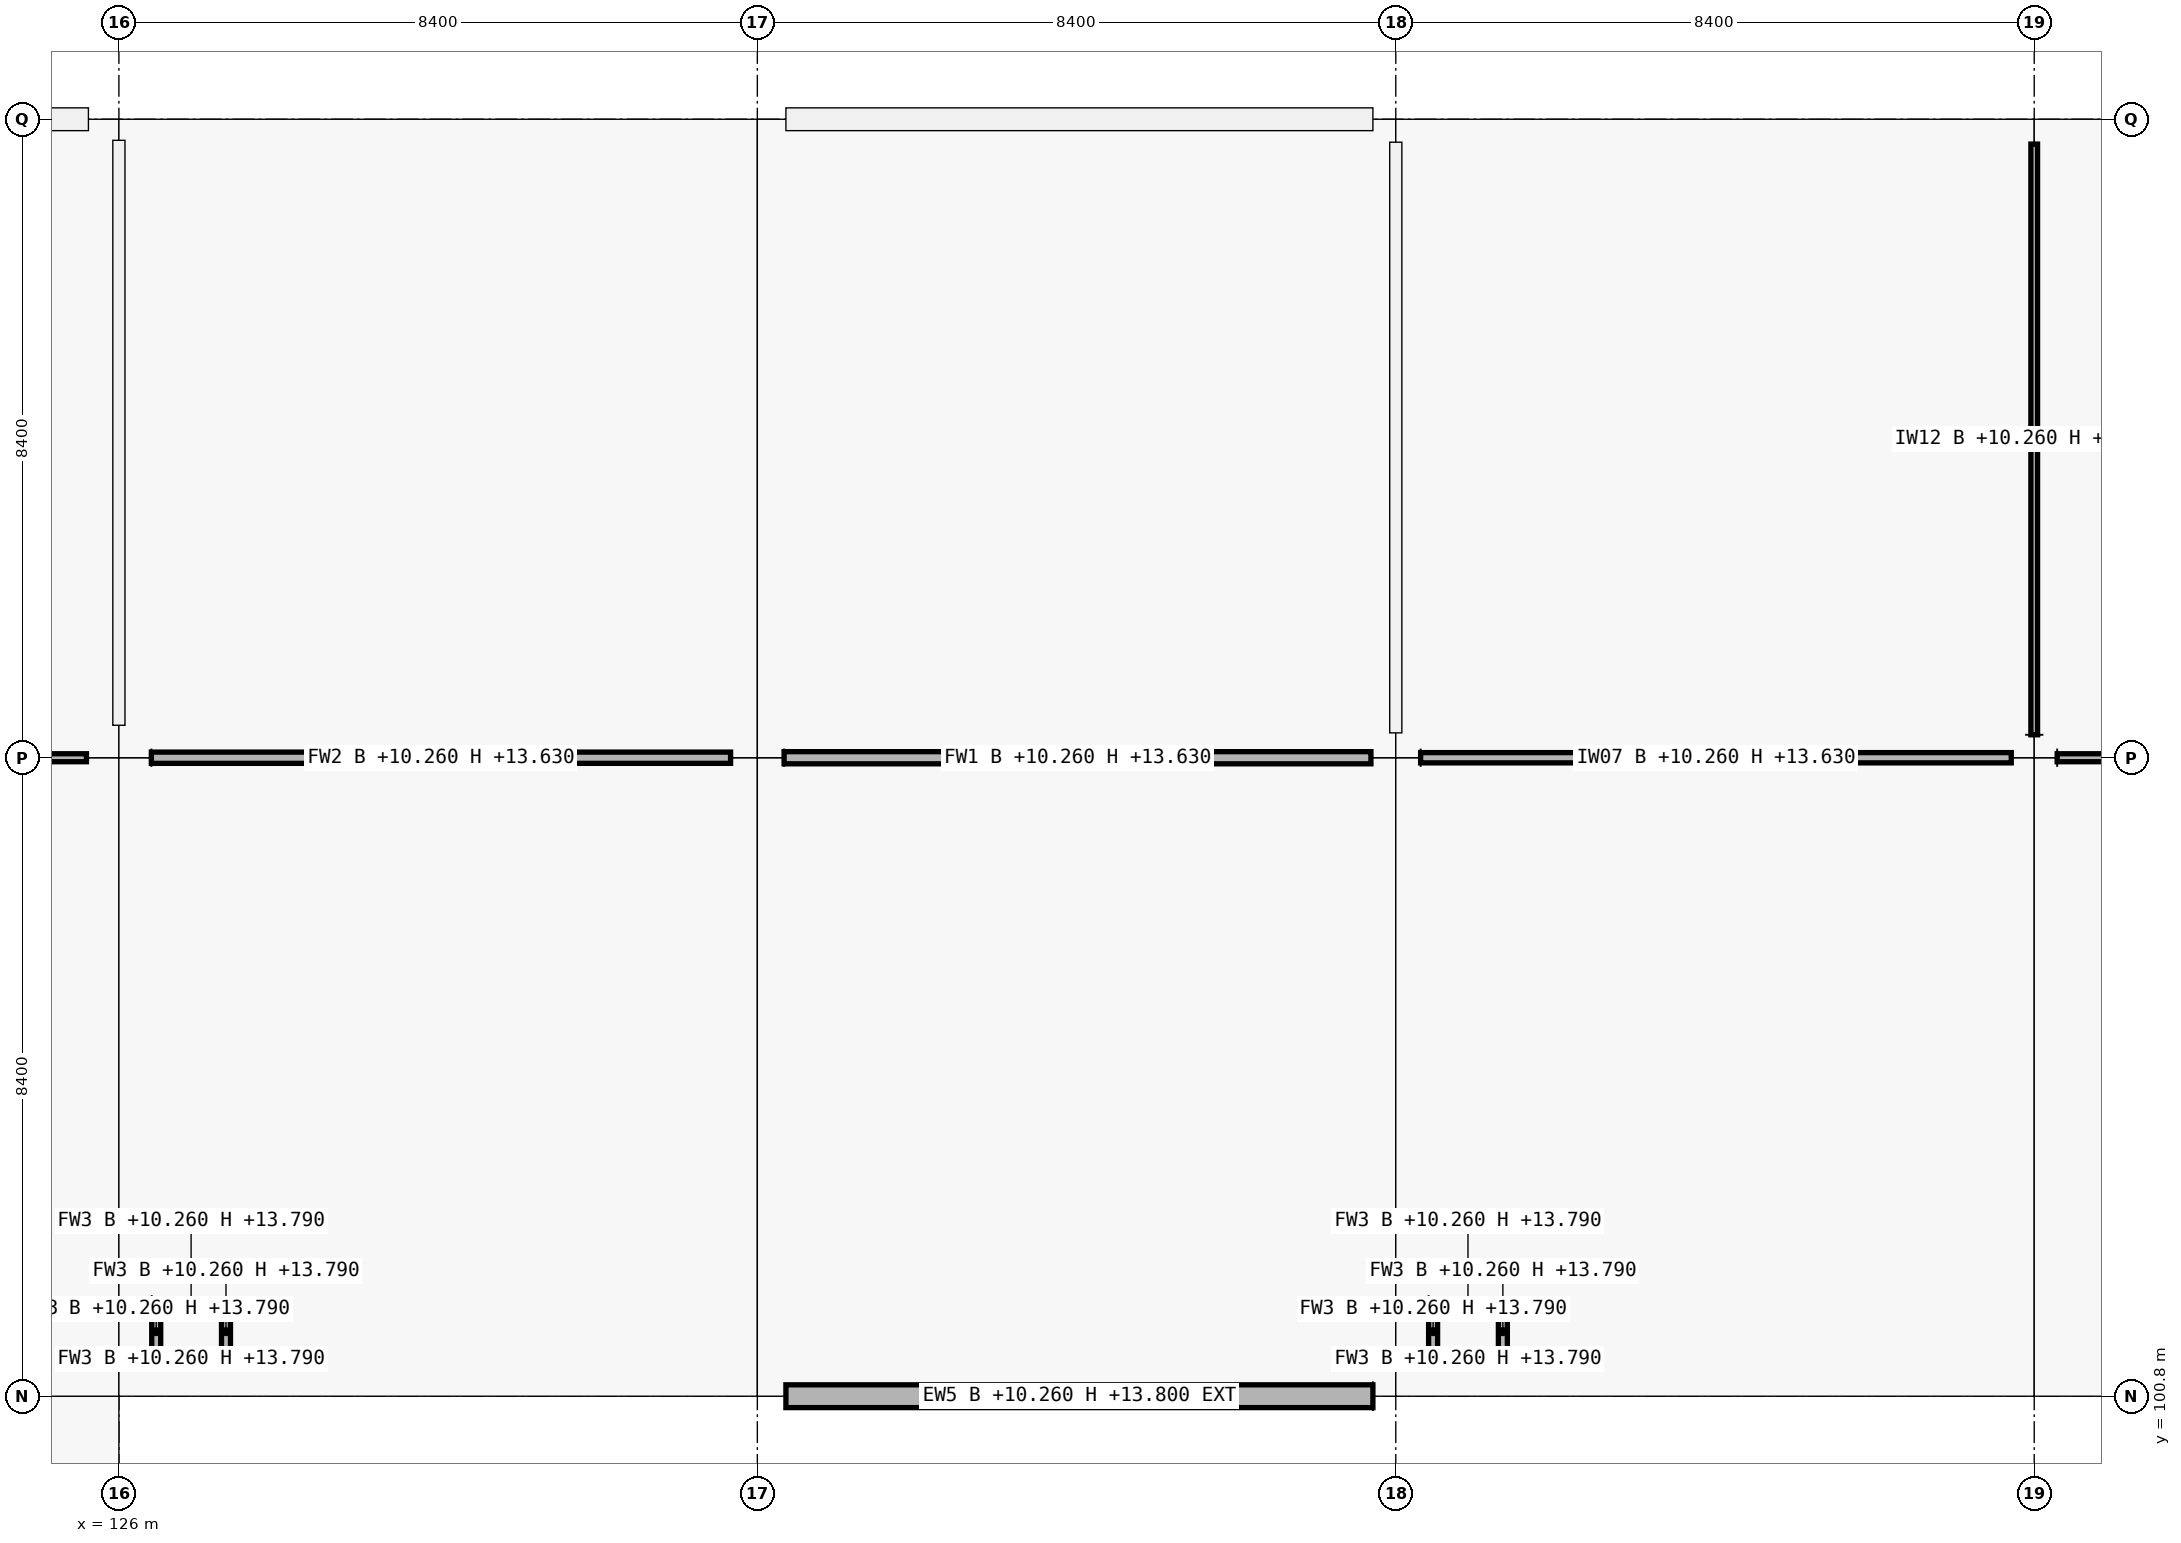
"""IFC4 building model, lengths in metres.
Left out: names, types, materials, properties, quantities, classifications, styles, units other than length and angle.
Written with IfcOpenShell. Run it as: python <this file> out.ifc"""

import sys

from ifc_helpers import new_model, si_unit, direction, frame, frame_2d, origin, origin_2d, place, context, subcontext, project, spatial, rectangle, extrude, element, fill, save


model = new_model("IFC4")
c1 = context("Model", 3, precision=1e-05, world=origin(), true_north=direction((0.0, 1.0)))
c2 = subcontext(c1, "Body", "Model", "MODEL_VIEW")
j1 = project(units=[si_unit("LENGTHUNIT", "METRE"), si_unit("PLANEANGLEUNIT", "RADIAN")], contexts=[c1])
p1 = place(None, origin())
s1 = spatial("IfcSite", under=j1, at=p1, CompositionType="ELEMENT")
p2 = place(p1, origin())
s2 = spatial("IfcBuilding", under=s1, at=p2, CompositionType="ELEMENT")
p3 = place(p2, frame((0.0, 0.0, 10.26)))
s3 = spatial("IfcBuildingStorey", under=s2, at=p3, CompositionType="ELEMENT", Elevation=10.26)
for number, where, z_axis, x_axis in (
    (1, (126.0, 100.8, 0.0), (0.0, 0.0, 1.0), (1.0, 0.0, 0.0)),
    (2, (126.0, 109.2, 0.0), (0.0, 0.0, 1.0), (1.0, 0.0, 0.0)),
):
    element("IfcColumn", number, at=place(p3, frame(where, z_axis=z_axis, x_axis=x_axis)), inside=s3, PredefinedType="COLUMN", context=c2, shape_type="SweptSolid", body=[
        extrude(rectangle(XDim=0.85, YDim=0.85, at=origin_2d()), origin(), (0.0, 0.0, 1.0), 4.5),
    ])
p4 = place(p3, frame((126.0, 117.6, 0.0), z_axis=(0.0, 0.0, 1.0), x_axis=(1.0, 0.0, 0.0)))
e3 = element("IfcColumn", 3, at=p4, inside=s3, PredefinedType="COLUMN", context=c2, shape_type="SweptSolid", body=[
    extrude(rectangle(XDim=0.8, YDim=0.55, at=origin_2d()), origin(), (0.0, 0.0, 1.0), 4.5),
])
p5 = place(p3, frame((134.4, 100.8, 0.0), z_axis=(0.0, 0.0, 1.0), x_axis=(1.0, 0.0, 0.0)))
e4 = element("IfcColumn", 4, at=p5, inside=s3, PredefinedType="COLUMN", context=c2, shape_type="SweptSolid", body=[
    extrude(rectangle(XDim=0.75, YDim=0.75, at=origin_2d()), origin(), (0.0, 0.0, 1.0), 4.5),
])
p6 = place(p3, frame((134.4, 109.2, 0.0), z_axis=(0.0, 0.0, 1.0), x_axis=(1.0, 0.0, 0.0)))
e5 = element("IfcColumn", 5, at=p6, inside=s3, PredefinedType="COLUMN", context=c2, shape_type="SweptSolid", body=[
    extrude(rectangle(XDim=0.7, YDim=0.7, at=origin_2d()), origin(), (0.0, 0.0, 1.0), 4.5),
])
p7 = place(p3, frame((134.4, 117.6, 0.0), z_axis=(0.0, 0.0, 1.0), x_axis=(1.0, 0.0, 0.0)))
e6 = element("IfcColumn", 6, at=p7, inside=s3, PredefinedType="COLUMN", context=c2, shape_type="SweptSolid", body=[
    extrude(rectangle(XDim=0.75, YDim=0.75, at=origin_2d()), origin(), (0.0, 0.0, 1.0), 4.5),
])
p8 = place(p3, frame((142.8, 100.8, 0.0), z_axis=(0.0, 0.0, 1.0), x_axis=(1.0, 0.0, 0.0)))
e7 = element("IfcColumn", 7, at=p8, inside=s3, PredefinedType="COLUMN", context=c2, shape_type="SweptSolid", body=[
    extrude(rectangle(XDim=0.6, YDim=0.6, at=origin_2d()), origin(), (0.0, 0.0, 1.0), 4.5),
])
p9 = place(p3, frame((142.8, 109.2, 0.0), z_axis=(0.0, 0.0, 1.0), x_axis=(1.0, 0.0, 0.0)))
e8 = element("IfcColumn", 8, at=p9, inside=s3, PredefinedType="COLUMN", context=c2, shape_type="SweptSolid", body=[
    extrude(rectangle(XDim=0.65, YDim=0.65, at=origin_2d()), origin(), (0.0, 0.0, 1.0), 4.5),
])
p10 = place(p3, frame((142.8, 117.6, 0.0), z_axis=(0.0, 0.0, 1.0), x_axis=(1.0, 0.0, 0.0)))
e9 = element("IfcColumn", 9, at=p10, inside=s3, PredefinedType="COLUMN", context=c2, shape_type="SweptSolid", body=[
    extrude(rectangle(XDim=0.6, YDim=0.6, at=origin_2d()), origin(), (0.0, 0.0, 1.0), 4.5),
])
p11 = place(p3, frame((151.2, 100.8, 0.0), z_axis=(0.0, 0.0, 1.0), x_axis=(1.0, 0.0, 0.0)))
e10 = element("IfcColumn", 10, at=p11, inside=s3, PredefinedType="COLUMN", context=c2, shape_type="SweptSolid", body=[
    extrude(rectangle(XDim=0.65, YDim=0.65, at=origin_2d()), origin(), (0.0, 0.0, 1.0), 4.5),
])
p12 = place(p3, frame((151.2, 109.2, 0.0), z_axis=(0.0, 0.0, 1.0), x_axis=(1.0, 0.0, 0.0)))
e11 = element("IfcColumn", 11, at=p12, inside=s3, PredefinedType="COLUMN", context=c2, shape_type="SweptSolid", body=[
    extrude(rectangle(XDim=0.6, YDim=0.6, at=origin_2d()), origin(), (0.0, 0.0, 1.0), 4.5),
])
p13 = place(p3, frame((151.2, 117.6, 0.0), z_axis=(0.0, 0.0, 1.0), x_axis=(1.0, 0.0, 0.0)))
e12 = element("IfcColumn", 12, at=p13, inside=s3, PredefinedType="COLUMN", context=c2, shape_type="SweptSolid", body=[
    extrude(rectangle(XDim=0.65, YDim=0.65, at=origin_2d()), origin(), (0.0, 0.0, 1.0), 4.5),
])
p14 = place(p3, frame((118.001, 117.6, 0.0), z_axis=(0.0, 0.0, 1.0), x_axis=(1.0, 0.0, 0.0)))
e13 = element("IfcWall", 13, at=p14, inside=s3, PredefinedType="SOLIDWALL", context=c2, shape_type="SweptSolid", body=[
    extrude(rectangle(XDim=7.598, YDim=0.3, at=frame_2d((3.799, 0.0))), origin(), (0.0, 0.0, 1.0), 3.54),
])
p15 = place(p14, frame((3.149, 0.0, 0.9)))
e14 = element("IfcOpeningElement", 14, at=p15, cuts=e13, PredefinedType="OPENING", context=c2, shape_type="SweptSolid", body=[
    extrude(rectangle(XDim=1.3, YDim=1.95, at=frame_2d((0.65, 0.975))), frame((0.0, 0.15, 0.0), z_axis=(0.0, -1.0, 0.0), x_axis=(1.0, 0.0, 0.0)), (0.0, 0.0, 1.0), 0.3),
])
p16 = place(p3, frame((142.499, 100.8, 0.0), z_axis=(0.0, 0.0, 1.0), x_axis=(-1.0, 0.0, 0.0)))
e15 = element("IfcWall", 15, at=p16, inside=s3, PredefinedType="SOLIDWALL", context=c2, shape_type="SweptSolid", body=[
    extrude(rectangle(XDim=7.723, YDim=0.3, at=frame_2d((3.862, 0.0))), origin(), (0.0, 0.0, 1.0), 3.54),
])
p17 = place(p16, frame((2.486, 0.0, 0.9)))
e16 = element("IfcOpeningElement", 16, at=p17, cuts=e15, PredefinedType="OPENING", context=c2, shape_type="SweptSolid", body=[
    extrude(rectangle(XDim=2.75, YDim=1.6, at=frame_2d((1.375, 0.8))), frame((0.0, 0.15, 0.0), z_axis=(0.0, -1.0, 0.0), x_axis=(1.0, 0.0, 0.0)), (0.0, 0.0, 1.0), 0.3),
])
p18 = place(p3, frame((134.776, 117.6, 0.0), z_axis=(0.0, 0.0, 1.0), x_axis=(1.0, 0.0, 0.0)))
e17 = element("IfcWall", 17, at=p18, inside=s3, PredefinedType="SOLIDWALL", context=c2, shape_type="SweptSolid", body=[
    extrude(rectangle(XDim=7.723, YDim=0.3, at=frame_2d((3.862, 0.0))), origin(), (0.0, 0.0, 1.0), 3.54),
])
p19 = place(p18, frame((3.087, 0.0, 0.9)))
e18 = element("IfcOpeningElement", 18, at=p19, cuts=e17, PredefinedType="OPENING", context=c2, shape_type="SweptSolid", body=[
    extrude(rectangle(XDim=1.55, YDim=1.6, at=frame_2d((0.775, 0.8))), frame((0.0, 0.15, 0.0), z_axis=(0.0, -1.0, 0.0), x_axis=(1.0, 0.0, 0.0)), (0.0, 0.0, 1.0), 0.3),
])
for number, where, z_axis, x_axis in (
    (19, (126.432, 101.291, 0.0), (0.0, 0.0, 1.0), (1.0, 0.0, 0.0)),
    (20, (126.432, 102.009, 0.0), (0.0, 0.0, 1.0), (1.0, 0.0, 0.0)),
):
    element("IfcWall", number, at=place(p3, frame(where, z_axis=z_axis, x_axis=x_axis)), inside=s3, PredefinedType="PARTITIONING", context=c2, shape_type="SweptSolid", body=[
        extrude(rectangle(XDim=1.036, YDim=0.118, at=frame_2d((0.518, 0.0))), origin(), (0.0, 0.0, 1.0), 3.53),
    ])
for number, where, z_axis, x_axis in (
    (21, (126.491, 101.35, 0.0), (0.0, 0.0, 1.0), (0.0, 1.0, 0.0)),
    (22, (127.409, 101.35, 0.0), (0.0, 0.0, 1.0), (0.0, 1.0, 0.0)),
):
    element("IfcWall", number, at=place(p3, frame(where, z_axis=z_axis, x_axis=x_axis)), inside=s3, PredefinedType="PARTITIONING", context=c2, shape_type="SweptSolid", body=[
        extrude(rectangle(XDim=0.6, YDim=0.118, at=frame_2d((0.3, 0.0))), origin(), (0.0, 0.0, 1.0), 3.53),
    ])
for number, where, z_axis, x_axis in (
    (23, (143.232, 101.291, 0.0), (0.0, 0.0, 1.0), (1.0, 0.0, 0.0)),
    (24, (143.232, 102.009, 0.0), (0.0, 0.0, 1.0), (1.0, 0.0, 0.0)),
):
    element("IfcWall", number, at=place(p3, frame(where, z_axis=z_axis, x_axis=x_axis)), inside=s3, PredefinedType="PARTITIONING", context=c2, shape_type="SweptSolid", body=[
        extrude(rectangle(XDim=1.036, YDim=0.118, at=frame_2d((0.518, 0.0))), origin(), (0.0, 0.0, 1.0), 3.53),
    ])
for number, where, z_axis, x_axis in (
    (25, (143.291, 101.35, 0.0), (0.0, 0.0, 1.0), (0.0, 1.0, 0.0)),
    (26, (144.209, 101.35, 0.0), (0.0, 0.0, 1.0), (0.0, 1.0, 0.0)),
):
    element("IfcWall", number, at=place(p3, frame(where, z_axis=z_axis, x_axis=x_axis)), inside=s3, PredefinedType="PARTITIONING", context=c2, shape_type="SweptSolid", body=[
        extrude(rectangle(XDim=0.6, YDim=0.118, at=frame_2d((0.3, 0.0))), origin(), (0.0, 0.0, 1.0), 3.53),
    ])
p20 = place(p3, frame((118.027, 109.2, 0.0), z_axis=(0.0, 0.0, 1.0), x_axis=(1.0, 0.0, 0.0)))
e27 = element("IfcWall", 27, at=p20, inside=s3, PredefinedType="PARTITIONING", context=c2, shape_type="SweptSolid", body=[
    extrude(rectangle(XDim=7.546, YDim=0.105, at=frame_2d((3.773, 0.0))), origin(), (0.0, 0.0, 1.0), 3.37),
])
p21 = place(p20, frame((3.283, 0.0, 0.0)))
e28 = element("IfcOpeningElement", 28, at=p21, cuts=e27, PredefinedType="OPENING", context=c2, shape_type="SweptSolid", body=[
    extrude(rectangle(XDim=0.98, YDim=2.18, at=frame_2d((0.49, 1.09))), frame((0.0, 0.052, 0.0), z_axis=(0.0, -1.0, 0.0), x_axis=(1.0, 0.0, 0.0)), (0.0, 0.0, 1.0), 0.105),
])
p22 = place(p3, frame((126.427, 109.2, 0.0), z_axis=(0.0, 0.0, 1.0), x_axis=(1.0, 0.0, 0.0)))
e29 = element("IfcWall", 29, at=p22, inside=s3, PredefinedType="PARTITIONING", context=c2, shape_type="SweptSolid", body=[
    extrude(rectangle(XDim=7.621, YDim=0.148, at=frame_2d((3.811, 0.0))), origin(), (0.0, 0.0, 1.0), 3.37),
])
p23 = place(p22, frame((3.361, 0.0, 0.0)))
e30 = element("IfcOpeningElement", 30, at=p23, cuts=e29, PredefinedType="OPENING", context=c2, shape_type="SweptSolid", body=[
    extrude(rectangle(XDim=0.9, YDim=2.05, at=frame_2d((0.45, 1.025))), frame((0.0, 0.074, 0.0), z_axis=(0.0, -1.0, 0.0), x_axis=(1.0, 0.0, 0.0)), (0.0, 0.0, 1.0), 0.148),
])
p24 = place(p3, frame((134.752, 109.2, 0.0), z_axis=(0.0, 0.0, 1.0), x_axis=(1.0, 0.0, 0.0)))
e31 = element("IfcWall", 31, at=p24, inside=s3, PredefinedType="PARTITIONING", context=c2, shape_type="SweptSolid", body=[
    extrude(rectangle(XDim=7.721, YDim=0.16, at=frame_2d((3.86, 0.0))), origin(), (0.0, 0.0, 1.0), 3.37),
])
p25 = place(p24, frame((3.061, 0.0, 0.0)))
e32 = element("IfcOpeningElement", 32, at=p25, cuts=e31, PredefinedType="OPENING", context=c2, shape_type="SweptSolid", body=[
    extrude(rectangle(XDim=1.6, YDim=2.2, at=frame_2d((0.8, 1.1))), frame((0.0, 0.08, 0.0), z_axis=(0.0, -1.0, 0.0), x_axis=(1.0, 0.0, 0.0)), (0.0, 0.0, 1.0), 0.16),
])
p26 = place(p3, frame((143.127, 109.2, 0.0), z_axis=(0.0, 0.0, 1.0), x_axis=(1.0, 0.0, 0.0)))
e33 = element("IfcWall", 33, at=p26, inside=s3, PredefinedType="PARTITIONING", context=c2, shape_type="SweptSolid", body=[
    extrude(rectangle(XDim=7.771, YDim=0.135, at=frame_2d((3.885, 0.0))), origin(), (0.0, 0.0, 1.0), 3.37),
])
p27 = place(p26, frame((3.361, 0.0, 0.0)))
e34 = element("IfcOpeningElement", 34, at=p27, cuts=e33, PredefinedType="OPENING", context=c2, shape_type="SweptSolid", body=[
    extrude(rectangle(XDim=1.05, YDim=2.12, at=frame_2d((0.525, 1.06))), frame((0.0, 0.067, 0.0), z_axis=(0.0, -1.0, 0.0), x_axis=(1.0, 0.0, 0.0)), (0.0, 0.0, 1.0), 0.135),
])
p28 = place(p3, frame((151.502, 109.2, 0.0), z_axis=(0.0, 0.0, 1.0), x_axis=(1.0, 0.0, 0.0)))
e35 = element("IfcWall", 35, at=p28, inside=s3, PredefinedType="PARTITIONING", context=c2, shape_type="SweptSolid", body=[
    extrude(rectangle(XDim=7.821, YDim=0.105, at=frame_2d((3.911, 0.0))), origin(), (0.0, 0.0, 1.0), 3.37),
])
p29 = place(p28, frame((3.405, 0.0, 0.0)))
e36 = element("IfcOpeningElement", 36, at=p29, cuts=e35, PredefinedType="OPENING", context=c2, shape_type="SweptSolid", body=[
    extrude(rectangle(XDim=1.01, YDim=2.12, at=frame_2d((0.505, 1.06))), frame((0.0, 0.052, 0.0), z_axis=(0.0, -1.0, 0.0), x_axis=(1.0, 0.0, 0.0)), (0.0, 0.0, 1.0), 0.105),
])
p30 = place(p3, frame((126.0, 109.627, 0.0), z_axis=(0.0, 0.0, 1.0), x_axis=(0.0, 1.0, 0.0)))
e37 = element("IfcWall", 37, at=p30, inside=s3, PredefinedType="PARTITIONING", context=c2, shape_type="SweptSolid", body=[
    extrude(rectangle(XDim=7.696, YDim=0.16, at=frame_2d((3.848, 0.0))), origin(), (0.0, 0.0, 1.0), 3.37),
])
p31 = place(p30, frame((3.273, 0.0, 0.0)))
e38 = element("IfcOpeningElement", 38, at=p31, cuts=e37, PredefinedType="OPENING", context=c2, shape_type="SweptSolid", body=[
    extrude(rectangle(XDim=1.15, YDim=2.2, at=frame_2d((0.575, 1.1))), frame((0.0, 0.08, 0.0), z_axis=(0.0, -1.0, 0.0), x_axis=(1.0, 0.0, 0.0)), (0.0, 0.0, 1.0), 0.16),
])
p32 = place(p3, frame((142.8, 109.527, 0.0), z_axis=(0.0, 0.0, 1.0), x_axis=(0.0, 1.0, 0.0)))
e39 = element("IfcWall", 39, at=p32, inside=s3, PredefinedType="PARTITIONING", context=c2, shape_type="SweptSolid", body=[
    extrude(rectangle(XDim=7.771, YDim=0.16, at=frame_2d((3.885, 0.0))), origin(), (0.0, 0.0, 1.0), 3.37),
])
p33 = place(p32, frame((3.335, 0.0, 0.0)))
e40 = element("IfcOpeningElement", 40, at=p33, cuts=e39, PredefinedType="OPENING", context=c2, shape_type="SweptSolid", body=[
    extrude(rectangle(XDim=1.1, YDim=2.15, at=frame_2d((0.55, 1.075))), frame((0.0, 0.08, 0.0), z_axis=(0.0, -1.0, 0.0), x_axis=(1.0, 0.0, 0.0)), (0.0, 0.0, 1.0), 0.16),
])
p34 = place(p3, frame((151.2, 109.502, 0.0), z_axis=(0.0, 0.0, 1.0), x_axis=(0.0, 1.0, 0.0)))
e41 = element("IfcWall", 41, at=p34, inside=s3, PredefinedType="PARTITIONING", context=c2, shape_type="SweptSolid", body=[
    extrude(rectangle(XDim=7.771, YDim=0.088, at=frame_2d((3.885, 0.0))), origin(), (0.0, 0.0, 1.0), 3.37),
])
p35 = place(p34, frame((3.421, 0.0, 0.0)))
e42 = element("IfcOpeningElement", 42, at=p35, cuts=e41, PredefinedType="OPENING", context=c2, shape_type="SweptSolid", body=[
    extrude(rectangle(XDim=0.93, YDim=2.12, at=frame_2d((0.465, 1.06))), frame((0.0, 0.044, 0.0), z_axis=(0.0, -1.0, 0.0), x_axis=(1.0, 0.0, 0.0)), (0.0, 0.0, 1.0), 0.088),
])
p36 = place(p17, origin())
e43 = element("IfcWindow", 43, at=p36, inside=s3, PartitioningType="SINGLE_PANEL", PredefinedType="WINDOW", context=c2, shape_type="SweptSolid", body=[
    extrude(rectangle(XDim=2.75, YDim=1.6, at=frame_2d((1.375, 0.8))), frame((0.0, 0.03, 0.0), z_axis=(0.0, -1.0, 0.0), x_axis=(1.0, 0.0, 0.0)), (0.0, 0.0, 1.0), 0.06),
])
fill(e16, e43)
p37 = place(p19, origin())
e44 = element("IfcWindow", 44, at=p37, inside=s3, PartitioningType="SINGLE_PANEL", PredefinedType="WINDOW", context=c2, shape_type="SweptSolid", body=[
    extrude(rectangle(XDim=1.55, YDim=1.6, at=frame_2d((0.775, 0.8))), frame((0.0, 0.03, 0.0), z_axis=(0.0, -1.0, 0.0), x_axis=(1.0, 0.0, 0.0)), (0.0, 0.0, 1.0), 0.06),
])
fill(e18, e44)
p38 = place(p23, origin())
e45 = element("IfcDoor", 45, at=p38, inside=s3, OperationType="SINGLE_SWING_RIGHT", PredefinedType="DOOR", context=c2, shape_type="SweptSolid", body=[
    extrude(rectangle(XDim=0.9, YDim=2.05, at=frame_2d((0.45, 1.025))), frame((0.0, 0.025, 0.0), z_axis=(0.0, -1.0, 0.0), x_axis=(1.0, 0.0, 0.0)), (0.0, 0.0, 1.0), 0.05),
])
fill(e30, e45)
p39 = place(p25, origin())
e46 = element("IfcDoor", 46, at=p39, inside=s3, OperationType="DOUBLE_DOOR_SINGLE_SWING", PredefinedType="DOOR", context=c2, shape_type="SweptSolid", body=[
    extrude(rectangle(XDim=1.6, YDim=2.2, at=frame_2d((0.8, 1.1))), frame((0.0, 0.025, 0.0), z_axis=(0.0, -1.0, 0.0), x_axis=(1.0, 0.0, 0.0)), (0.0, 0.0, 1.0), 0.05),
])
fill(e32, e46)
p40 = place(p27, origin())
e47 = element("IfcDoor", 47, at=p40, inside=s3, OperationType="SINGLE_SWING_RIGHT", PredefinedType="DOOR", context=c2, shape_type="SweptSolid", body=[
    extrude(rectangle(XDim=1.05, YDim=2.12, at=frame_2d((0.525, 1.06))), frame((0.0, 0.025, 0.0), z_axis=(0.0, -1.0, 0.0), x_axis=(1.0, 0.0, 0.0)), (0.0, 0.0, 1.0), 0.05),
])
fill(e34, e47)
p41 = place(p31, origin())
e48 = element("IfcDoor", 48, at=p41, inside=s3, OperationType="SINGLE_SWING_RIGHT", PredefinedType="DOOR", context=c2, shape_type="SweptSolid", body=[
    extrude(rectangle(XDim=1.15, YDim=2.2, at=frame_2d((0.575, 1.1))), frame((0.0, 0.025, 0.0), z_axis=(0.0, -1.0, 0.0), x_axis=(1.0, 0.0, 0.0)), (0.0, 0.0, 1.0), 0.05),
])
fill(e38, e48)
p42 = place(p33, origin())
e49 = element("IfcDoor", 49, at=p42, inside=s3, OperationType="SINGLE_SWING_LEFT", PredefinedType="DOOR", context=c2, shape_type="SweptSolid", body=[
    extrude(rectangle(XDim=1.1, YDim=2.15, at=frame_2d((0.55, 1.075))), frame((0.0, 0.025, 0.0), z_axis=(0.0, -1.0, 0.0), x_axis=(1.0, 0.0, 0.0)), (0.0, 0.0, 1.0), 0.05),
])
fill(e40, e49)
p43 = place(p35, origin())
e50 = element("IfcDoor", 50, at=p43, inside=s3, OperationType="SINGLE_SWING_RIGHT", PredefinedType="DOOR", context=c2, shape_type="SweptSolid", body=[
    extrude(rectangle(XDim=0.93, YDim=2.12, at=frame_2d((0.465, 1.06))), frame((0.0, 0.025, 0.0), z_axis=(0.0, -1.0, 0.0), x_axis=(1.0, 0.0, 0.0)), (0.0, 0.0, 1.0), 0.05),
])
fill(e42, e50)
save(model, sys.argv[1])
